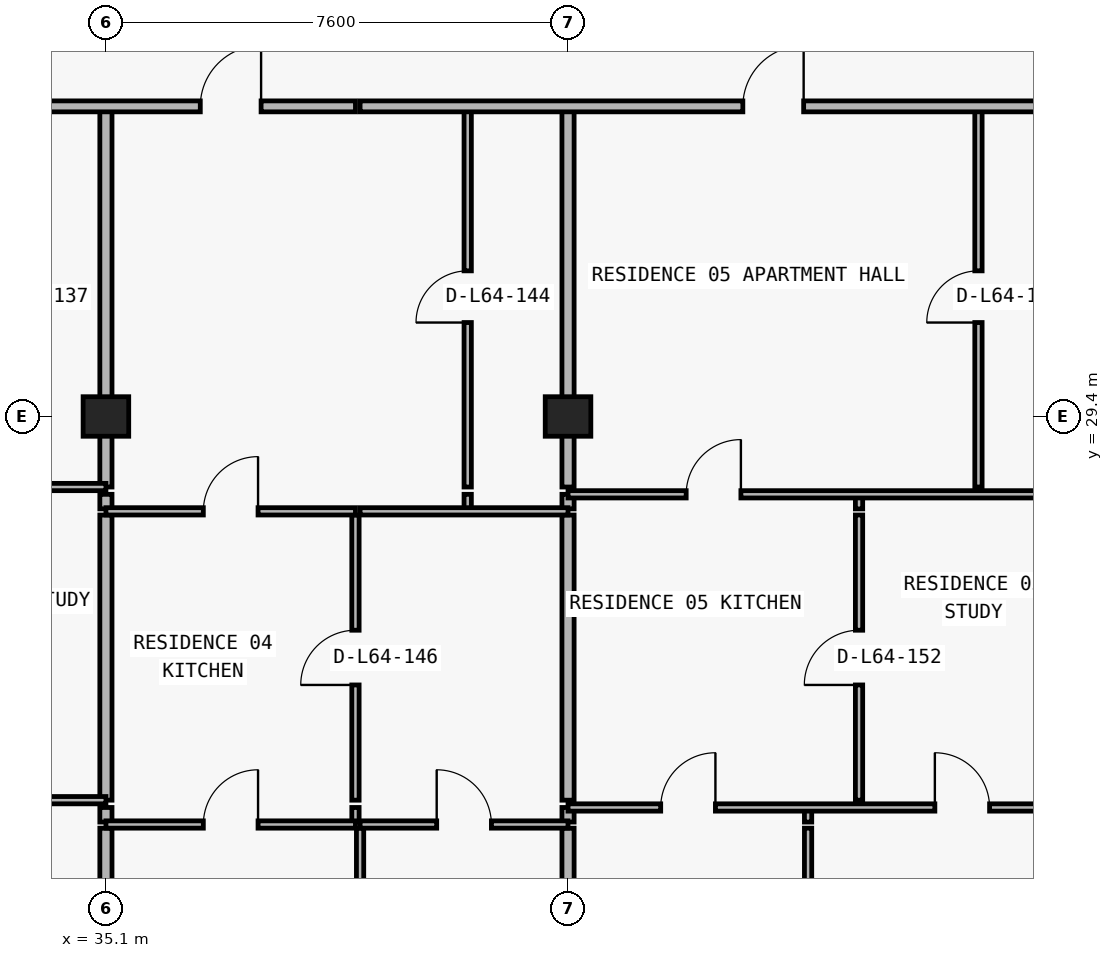
"""IFC4 building model, lengths in metres.
Left out: names, types, materials, properties, quantities, classifications, styles, units other than length and angle.
Written with IfcOpenShell. Run it as: python <this file> out.ifc"""

import sys

from ifc_helpers import new_model, si_unit, direction, frame, frame_2d, origin, origin_2d, place, context, subcontext, project, spatial, rectangle, extrude, element, fill, save


model = new_model("IFC4")
c1 = context("Model", 3, precision=1e-05, world=origin(), true_north=direction((0.0, 1.0)))
c2 = subcontext(c1, "Body", "Model", "MODEL_VIEW")
j1 = project(units=[si_unit("LENGTHUNIT", "METRE"), si_unit("PLANEANGLEUNIT", "RADIAN")], contexts=[c1])
p1 = place(None, origin())
s1 = spatial("IfcSite", under=j1, at=p1, CompositionType="ELEMENT")
p2 = place(p1, origin())
s2 = spatial("IfcBuilding", under=s1, at=p2, CompositionType="ELEMENT")
p3 = place(p2, frame((0.0, 0.0, 229.8)))
s3 = spatial("IfcBuildingStorey", under=s2, at=p3, CompositionType="ELEMENT", Elevation=229.8)
for number, where, z_axis, x_axis in (
    (1, (35.1, 29.4, 0.0), (0.0, 0.0, 1.0), (1.0, 0.0, 0.0)),
    (2, (42.7, 29.4, 0.0), (0.0, 0.0, 1.0), (1.0, 0.0, 0.0)),
):
    element("IfcColumn", number, at=place(p3, frame(where, z_axis=z_axis, x_axis=x_axis)), inside=s3, PredefinedType="COLUMN", context=c2, shape_type="SweptSolid", body=[
        extrude(rectangle(XDim=0.75, YDim=0.65, at=origin_2d()), origin(), (0.0, 0.0, 1.0), 3.05),
    ])
p4 = place(p3, frame((35.1, 13.34, 0.0), z_axis=(0.0, 0.0, 1.0), x_axis=(0.0, 1.0, 0.0)))
e3 = element("IfcWall", 3, at=p4, inside=s3, PredefinedType="PARTITIONING", context=c2, shape_type="SweptSolid", body=[
    extrude(rectangle(XDim=9.29, YDim=0.2, at=frame_2d((4.645, 0.0))), origin(), (0.0, 0.0, 1.0), 2.263),
])
p5 = place(p3, frame((35.1, 22.73, 0.0), z_axis=(0.0, 0.0, 1.0), x_axis=(0.0, 1.0, 0.0)))
e4 = element("IfcWall", 4, at=p5, inside=s3, PredefinedType="PARTITIONING", context=c2, shape_type="SweptSolid", body=[
    extrude(rectangle(XDim=0.24, YDim=0.2, at=frame_2d((0.12, 0.0))), origin(), (0.0, 0.0, 1.0), 2.263),
])
p6 = place(p3, frame((35.1, 23.09, 0.0), z_axis=(0.0, 0.0, 1.0), x_axis=(0.0, 1.0, 0.0)))
e5 = element("IfcWall", 5, at=p6, inside=s3, PredefinedType="PARTITIONING", context=c2, shape_type="SweptSolid", body=[
    extrude(rectangle(XDim=4.69, YDim=0.2, at=frame_2d((2.345, 0.0))), origin(), (0.0, 0.0, 1.0), 2.263),
])
p7 = place(p3, frame((35.1, 27.88, 0.0), z_axis=(0.0, 0.0, 1.0), x_axis=(0.0, 1.0, 0.0)))
e6 = element("IfcWall", 6, at=p7, inside=s3, PredefinedType="PARTITIONING", context=c2, shape_type="SweptSolid", body=[
    extrude(rectangle(XDim=0.24, YDim=0.2, at=frame_2d((0.12, 0.0))), origin(), (0.0, 0.0, 1.0), 2.263),
])
p8 = place(p3, frame((35.1, 28.24, 0.0), z_axis=(0.0, 0.0, 1.0), x_axis=(0.0, 1.0, 0.0)))
e7 = element("IfcWall", 7, at=p8, inside=s3, PredefinedType="PARTITIONING", context=c2, shape_type="SweptSolid", body=[
    extrude(rectangle(XDim=6.26, YDim=0.2, at=frame_2d((3.13, 0.0))), origin(), (0.0, 0.0, 1.0), 2.263),
])
p9 = place(p3, frame((39.204, 22.73, 0.0), z_axis=(0.0, 0.0, 1.0), x_axis=(0.0, 1.0, 0.0)))
e8 = element("IfcWall", 8, at=p9, inside=s3, PredefinedType="PARTITIONING", context=c2, shape_type="SweptSolid", body=[
    extrude(rectangle(XDim=0.24, YDim=0.12, at=frame_2d((0.12, 0.0))), origin(), (0.0, 0.0, 1.0), 3.05),
])
p10 = place(p3, frame((39.204, 23.09, 0.0), z_axis=(0.0, 0.0, 1.0), x_axis=(0.0, 1.0, 0.0)))
e9 = element("IfcWall", 9, at=p10, inside=s3, PredefinedType="PARTITIONING", context=c2, shape_type="SweptSolid", body=[
    extrude(rectangle(XDim=4.69, YDim=0.12, at=frame_2d((2.345, 0.0))), origin(), (0.0, 0.0, 1.0), 3.05),
])
p11 = place(p10, frame((1.895, 0.0, 0.0)))
e10 = element("IfcOpeningElement", 10, at=p11, cuts=e9, PredefinedType="OPENING", context=c2, shape_type="SweptSolid", body=[
    extrude(rectangle(XDim=0.9, YDim=2.15, at=frame_2d((0.45, 1.075))), frame((0.0, 0.07, 0.0), z_axis=(0.0, -1.0, 0.0), x_axis=(1.0, 0.0, 0.0)), (0.0, 0.0, 1.0), 0.14),
])
p12 = place(p3, frame((39.28, 13.34, 0.0), z_axis=(0.0, 0.0, 1.0), x_axis=(0.0, 1.0, 0.0)))
e11 = element("IfcWall", 11, at=p12, inside=s3, PredefinedType="PARTITIONING", context=c2, shape_type="SweptSolid", body=[
    extrude(rectangle(XDim=9.29, YDim=0.12, at=frame_2d((4.645, 0.0))), origin(), (0.0, 0.0, 1.0), 3.05),
])
p13 = place(p3, frame((41.05, 27.88, 0.0), z_axis=(0.0, 0.0, 1.0), x_axis=(0.0, 1.0, 0.0)))
e12 = element("IfcWall", 12, at=p13, inside=s3, PredefinedType="PARTITIONING", context=c2, shape_type="SweptSolid", body=[
    extrude(rectangle(XDim=0.24, YDim=0.12, at=frame_2d((0.12, 0.0))), origin(), (0.0, 0.0, 1.0), 3.05),
])
p14 = place(p3, frame((41.05, 28.24, 0.0), z_axis=(0.0, 0.0, 1.0), x_axis=(0.0, 1.0, 0.0)))
e13 = element("IfcWall", 13, at=p14, inside=s3, PredefinedType="PARTITIONING", context=c2, shape_type="SweptSolid", body=[
    extrude(rectangle(XDim=6.26, YDim=0.12, at=frame_2d((3.13, 0.0))), origin(), (0.0, 0.0, 1.0), 3.05),
])
p15 = place(p14, frame((2.705, 0.0, 0.0)))
e14 = element("IfcOpeningElement", 14, at=p15, cuts=e13, PredefinedType="OPENING", context=c2, shape_type="SweptSolid", body=[
    extrude(rectangle(XDim=0.85, YDim=2.1, at=frame_2d((0.425, 1.05))), frame((0.0, 0.07, 0.0), z_axis=(0.0, -1.0, 0.0), x_axis=(1.0, 0.0, 0.0)), (0.0, 0.0, 1.0), 0.14),
])
p16 = place(p3, frame((42.7, 13.34, 0.0), z_axis=(0.0, 0.0, 1.0), x_axis=(0.0, 1.0, 0.0)))
e15 = element("IfcWall", 15, at=p16, inside=s3, PredefinedType="PARTITIONING", context=c2, shape_type="SweptSolid", body=[
    extrude(rectangle(XDim=9.29, YDim=0.2, at=frame_2d((4.645, 0.0))), origin(), (0.0, 0.0, 1.0), 2.263),
])
p17 = place(p3, frame((42.7, 22.73, 0.0), z_axis=(0.0, 0.0, 1.0), x_axis=(0.0, 1.0, 0.0)))
e16 = element("IfcWall", 16, at=p17, inside=s3, PredefinedType="PARTITIONING", context=c2, shape_type="SweptSolid", body=[
    extrude(rectangle(XDim=0.24, YDim=0.2, at=frame_2d((0.12, 0.0))), origin(), (0.0, 0.0, 1.0), 2.263),
])
p18 = place(p3, frame((42.7, 23.09, 0.0), z_axis=(0.0, 0.0, 1.0), x_axis=(0.0, 1.0, 0.0)))
e17 = element("IfcWall", 17, at=p18, inside=s3, PredefinedType="PARTITIONING", context=c2, shape_type="SweptSolid", body=[
    extrude(rectangle(XDim=4.69, YDim=0.2, at=frame_2d((2.345, 0.0))), origin(), (0.0, 0.0, 1.0), 2.263),
])
p19 = place(p3, frame((42.7, 27.88, 0.0), z_axis=(0.0, 0.0, 1.0), x_axis=(0.0, 1.0, 0.0)))
e18 = element("IfcWall", 18, at=p19, inside=s3, PredefinedType="PARTITIONING", context=c2, shape_type="SweptSolid", body=[
    extrude(rectangle(XDim=0.24, YDim=0.2, at=frame_2d((0.12, 0.0))), origin(), (0.0, 0.0, 1.0), 2.263),
])
p20 = place(p3, frame((42.7, 28.24, 0.0), z_axis=(0.0, 0.0, 1.0), x_axis=(0.0, 1.0, 0.0)))
e19 = element("IfcWall", 19, at=p20, inside=s3, PredefinedType="PARTITIONING", context=c2, shape_type="SweptSolid", body=[
    extrude(rectangle(XDim=6.26, YDim=0.2, at=frame_2d((3.13, 0.0))), origin(), (0.0, 0.0, 1.0), 2.263),
])
p21 = place(p3, frame((46.648, 13.34, 0.0), z_axis=(0.0, 0.0, 1.0), x_axis=(0.0, 1.0, 0.0)))
e20 = element("IfcWall", 20, at=p21, inside=s3, PredefinedType="PARTITIONING", context=c2, shape_type="SweptSolid", body=[
    extrude(rectangle(XDim=9.29, YDim=0.12, at=frame_2d((4.645, 0.0))), origin(), (0.0, 0.0, 1.0), 3.05),
])
p22 = place(p3, frame((46.648, 22.73, 0.0), z_axis=(0.0, 0.0, 1.0), x_axis=(0.0, 1.0, 0.0)))
e21 = element("IfcWall", 21, at=p22, inside=s3, PredefinedType="PARTITIONING", context=c2, shape_type="SweptSolid", body=[
    extrude(rectangle(XDim=0.24, YDim=0.12, at=frame_2d((0.12, 0.0))), origin(), (0.0, 0.0, 1.0), 3.05),
])
p23 = place(p3, frame((47.486, 23.09, 0.0), z_axis=(0.0, 0.0, 1.0), x_axis=(0.0, 1.0, 0.0)))
e22 = element("IfcWall", 22, at=p23, inside=s3, PredefinedType="PARTITIONING", context=c2, shape_type="SweptSolid", body=[
    extrude(rectangle(XDim=4.69, YDim=0.12, at=frame_2d((2.345, 0.0))), origin(), (0.0, 0.0, 1.0), 3.05),
])
p24 = place(p23, frame((1.895, 0.0, 0.0)))
e23 = element("IfcOpeningElement", 23, at=p24, cuts=e22, PredefinedType="OPENING", context=c2, shape_type="SweptSolid", body=[
    extrude(rectangle(XDim=0.9, YDim=2.15, at=frame_2d((0.45, 1.075))), frame((0.0, 0.07, 0.0), z_axis=(0.0, -1.0, 0.0), x_axis=(1.0, 0.0, 0.0)), (0.0, 0.0, 1.0), 0.14),
])
p25 = place(p3, frame((47.486, 27.88, 0.0), z_axis=(0.0, 0.0, 1.0), x_axis=(0.0, 1.0, 0.0)))
e24 = element("IfcWall", 24, at=p25, inside=s3, PredefinedType="PARTITIONING", context=c2, shape_type="SweptSolid", body=[
    extrude(rectangle(XDim=0.24, YDim=0.12, at=frame_2d((0.12, 0.0))), origin(), (0.0, 0.0, 1.0), 3.05),
])
p26 = place(p3, frame((49.45, 28.24, 0.0), z_axis=(0.0, 0.0, 1.0), x_axis=(0.0, 1.0, 0.0)))
e25 = element("IfcWall", 25, at=p26, inside=s3, PredefinedType="PARTITIONING", context=c2, shape_type="SweptSolid", body=[
    extrude(rectangle(XDim=6.26, YDim=0.12, at=frame_2d((3.13, 0.0))), origin(), (0.0, 0.0, 1.0), 3.05),
])
p27 = place(p26, frame((2.705, 0.0, 0.0)))
e26 = element("IfcOpeningElement", 26, at=p27, cuts=e25, PredefinedType="OPENING", context=c2, shape_type="SweptSolid", body=[
    extrude(rectangle(XDim=0.85, YDim=2.1, at=frame_2d((0.425, 1.05))), frame((0.0, 0.07, 0.0), z_axis=(0.0, -1.0, 0.0), x_axis=(1.0, 0.0, 0.0)), (0.0, 0.0, 1.0), 0.14),
])
p28 = place(p3, frame((35.1, 22.69, 0.0), z_axis=(0.0, 0.0, 1.0), x_axis=(1.0, 0.0, 0.0)))
e27 = element("IfcWall", 27, at=p28, inside=s3, PredefinedType="PARTITIONING", context=c2, shape_type="SweptSolid", body=[
    extrude(rectangle(XDim=4.104, YDim=0.12, at=frame_2d((2.052, 0.0))), origin(), (0.0, 0.0, 1.0), 3.05),
])
p29 = place(p28, frame((1.602, 0.0, 0.0)))
e28 = element("IfcOpeningElement", 28, at=p29, cuts=e27, PredefinedType="OPENING", context=c2, shape_type="SweptSolid", body=[
    extrude(rectangle(XDim=0.9, YDim=2.15, at=frame_2d((0.45, 1.075))), frame((0.0, 0.07, 0.0), z_axis=(0.0, -1.0, 0.0), x_axis=(1.0, 0.0, 0.0)), (0.0, 0.0, 1.0), 0.14),
])
p30 = place(p3, frame((39.28, 22.69, 0.0), z_axis=(0.0, 0.0, 1.0), x_axis=(1.0, 0.0, 0.0)))
e29 = element("IfcWall", 29, at=p30, inside=s3, PredefinedType="PARTITIONING", context=c2, shape_type="SweptSolid", body=[
    extrude(rectangle(XDim=3.42, YDim=0.12, at=frame_2d((1.71, 0.0))), origin(), (0.0, 0.0, 1.0), 3.05),
])
p31 = place(p30, frame((1.26, 0.0, 0.0)))
e30 = element("IfcOpeningElement", 30, at=p31, cuts=e29, PredefinedType="OPENING", context=c2, shape_type="SweptSolid", body=[
    extrude(rectangle(XDim=0.9, YDim=2.15, at=frame_2d((0.45, 1.075))), frame((0.0, 0.07, 0.0), z_axis=(0.0, -1.0, 0.0), x_axis=(1.0, 0.0, 0.0)), (0.0, 0.0, 1.0), 0.14),
])
p32 = place(p3, frame((42.7, 22.97, 0.0), z_axis=(0.0, 0.0, 1.0), x_axis=(1.0, 0.0, 0.0)))
e31 = element("IfcWall", 31, at=p32, inside=s3, PredefinedType="PARTITIONING", context=c2, shape_type="SweptSolid", body=[
    extrude(rectangle(XDim=8.18, YDim=0.12, at=frame_2d((4.09, 0.0))), origin(), (0.0, 0.0, 1.0), 3.05),
])
p33 = place(p32, frame((1.524, 0.0, 0.0)))
e32 = element("IfcOpeningElement", 32, at=p33, cuts=e31, PredefinedType="OPENING", context=c2, shape_type="SweptSolid", body=[
    extrude(rectangle(XDim=0.9, YDim=2.15, at=frame_2d((0.45, 1.075))), frame((0.0, 0.07, 0.0), z_axis=(0.0, -1.0, 0.0), x_axis=(1.0, 0.0, 0.0)), (0.0, 0.0, 1.0), 0.14),
])
p34 = place(p32, frame((6.033, 0.0, 0.0)))
e33 = element("IfcOpeningElement", 33, at=p34, cuts=e31, PredefinedType="OPENING", context=c2, shape_type="SweptSolid", body=[
    extrude(rectangle(XDim=0.9, YDim=2.15, at=frame_2d((0.45, 1.075))), frame((0.0, 0.07, 0.0), z_axis=(0.0, -1.0, 0.0), x_axis=(1.0, 0.0, 0.0)), (0.0, 0.0, 1.0), 0.14),
])
p35 = place(p3, frame((26.92, 23.09, 0.0), z_axis=(0.0, 0.0, 1.0), x_axis=(1.0, 0.0, 0.0)))
e34 = element("IfcWall", 34, at=p35, inside=s3, PredefinedType="PARTITIONING", context=c2, shape_type="SweptSolid", body=[
    extrude(rectangle(XDim=8.18, YDim=0.12, at=frame_2d((4.09, 0.0))), origin(), (0.0, 0.0, 1.0), 3.05),
])
p36 = place(p35, frame((1.414, 0.0, 0.0)))
e35 = element("IfcOpeningElement", 35, at=p36, cuts=e34, PredefinedType="OPENING", context=c2, shape_type="SweptSolid", body=[
    extrude(rectangle(XDim=0.9, YDim=2.15, at=frame_2d((0.45, 1.075))), frame((0.0, 0.07, 0.0), z_axis=(0.0, -1.0, 0.0), x_axis=(1.0, 0.0, 0.0)), (0.0, 0.0, 1.0), 0.14),
])
p37 = place(p35, frame((5.673, 0.0, 0.0)))
e36 = element("IfcOpeningElement", 36, at=p37, cuts=e34, PredefinedType="OPENING", context=c2, shape_type="SweptSolid", body=[
    extrude(rectangle(XDim=0.9, YDim=2.15, at=frame_2d((0.45, 1.075))), frame((0.0, 0.07, 0.0), z_axis=(0.0, -1.0, 0.0), x_axis=(1.0, 0.0, 0.0)), (0.0, 0.0, 1.0), 0.14),
])
p38 = place(p3, frame((35.1, 27.84, 0.0), z_axis=(0.0, 0.0, 1.0), x_axis=(1.0, 0.0, 0.0)))
e37 = element("IfcWall", 37, at=p38, inside=s3, PredefinedType="PARTITIONING", context=c2, shape_type="SweptSolid", body=[
    extrude(rectangle(XDim=4.104, YDim=0.12, at=frame_2d((2.052, 0.0))), origin(), (0.0, 0.0, 1.0), 3.05),
])
p39 = place(p38, frame((1.602, 0.0, 0.0)))
e38 = element("IfcOpeningElement", 38, at=p39, cuts=e37, PredefinedType="OPENING", context=c2, shape_type="SweptSolid", body=[
    extrude(rectangle(XDim=0.9, YDim=2.15, at=frame_2d((0.45, 1.075))), frame((0.0, 0.07, 0.0), z_axis=(0.0, -1.0, 0.0), x_axis=(1.0, 0.0, 0.0)), (0.0, 0.0, 1.0), 0.14),
])
p40 = place(p3, frame((39.28, 27.84, 0.0), z_axis=(0.0, 0.0, 1.0), x_axis=(1.0, 0.0, 0.0)))
e39 = element("IfcWall", 39, at=p40, inside=s3, PredefinedType="PARTITIONING", context=c2, shape_type="SweptSolid", body=[
    extrude(rectangle(XDim=3.42, YDim=0.12, at=frame_2d((1.71, 0.0))), origin(), (0.0, 0.0, 1.0), 3.05),
])
p41 = place(p3, frame((42.7, 28.12, 0.0), z_axis=(0.0, 0.0, 1.0), x_axis=(1.0, 0.0, 0.0)))
e40 = element("IfcWall", 40, at=p41, inside=s3, PredefinedType="PARTITIONING", context=c2, shape_type="SweptSolid", body=[
    extrude(rectangle(XDim=8.18, YDim=0.12, at=frame_2d((4.09, 0.0))), origin(), (0.0, 0.0, 1.0), 3.05),
])
p42 = place(p41, frame((1.943, 0.0, 0.0)))
e41 = element("IfcOpeningElement", 41, at=p42, cuts=e40, PredefinedType="OPENING", context=c2, shape_type="SweptSolid", body=[
    extrude(rectangle(XDim=0.9, YDim=2.15, at=frame_2d((0.45, 1.075))), frame((0.0, 0.07, 0.0), z_axis=(0.0, -1.0, 0.0), x_axis=(1.0, 0.0, 0.0)), (0.0, 0.0, 1.0), 0.14),
])
p43 = place(p3, frame((26.92, 28.24, 0.0), z_axis=(0.0, 0.0, 1.0), x_axis=(1.0, 0.0, 0.0)))
e42 = element("IfcWall", 42, at=p43, inside=s3, PredefinedType="PARTITIONING", context=c2, shape_type="SweptSolid", body=[
    extrude(rectangle(XDim=8.18, YDim=0.12, at=frame_2d((4.09, 0.0))), origin(), (0.0, 0.0, 1.0), 3.05),
])
p44 = place(p43, frame((1.583, 0.0, 0.0)))
e43 = element("IfcOpeningElement", 43, at=p44, cuts=e42, PredefinedType="OPENING", context=c2, shape_type="SweptSolid", body=[
    extrude(rectangle(XDim=0.9, YDim=2.15, at=frame_2d((0.45, 1.075))), frame((0.0, 0.07, 0.0), z_axis=(0.0, -1.0, 0.0), x_axis=(1.0, 0.0, 0.0)), (0.0, 0.0, 1.0), 0.14),
])
p45 = place(p3, frame((26.7, 34.5, 0.0), z_axis=(0.0, 0.0, 1.0), x_axis=(1.0, 0.0, 0.0)))
e44 = element("IfcWall", 44, at=p45, inside=s3, PredefinedType="PARTITIONING", context=c2, shape_type="SweptSolid", body=[
    extrude(rectangle(XDim=12.504, YDim=0.18, at=frame_2d((6.252, 0.0))), origin(), (0.0, 0.0, 1.0), 3.05),
])
p46 = place(p45, frame((2.875, 0.0, 0.0)))
e45 = element("IfcOpeningElement", 45, at=p46, cuts=e44, PredefinedType="OPENING", context=c2, shape_type="SweptSolid", body=[
    extrude(rectangle(XDim=1.0, YDim=2.2, at=frame_2d((0.5, 1.1))), frame((0.0, 0.1, 0.0), z_axis=(0.0, -1.0, 0.0), x_axis=(1.0, 0.0, 0.0)), (0.0, 0.0, 1.0), 0.2),
])
p47 = place(p45, frame((9.952, 0.0, 0.0)))
e46 = element("IfcOpeningElement", 46, at=p47, cuts=e44, PredefinedType="OPENING", context=c2, shape_type="SweptSolid", body=[
    extrude(rectangle(XDim=1.0, YDim=2.2, at=frame_2d((0.5, 1.1))), frame((0.0, 0.1, 0.0), z_axis=(0.0, -1.0, 0.0), x_axis=(1.0, 0.0, 0.0)), (0.0, 0.0, 1.0), 0.2),
])
p48 = place(p3, frame((39.28, 34.5, 0.0), z_axis=(0.0, 0.0, 1.0), x_axis=(1.0, 0.0, 0.0)))
e47 = element("IfcWall", 47, at=p48, inside=s3, PredefinedType="PARTITIONING", context=c2, shape_type="SweptSolid", body=[
    extrude(rectangle(XDim=26.42, YDim=0.18, at=frame_2d((13.21, 0.0))), origin(), (0.0, 0.0, 1.0), 3.05),
])
p49 = place(p48, frame((6.295, 0.0, 0.0)))
e48 = element("IfcOpeningElement", 48, at=p49, cuts=e47, PredefinedType="OPENING", context=c2, shape_type="SweptSolid", body=[
    extrude(rectangle(XDim=1.0, YDim=2.2, at=frame_2d((0.5, 1.1))), frame((0.0, 0.1, 0.0), z_axis=(0.0, -1.0, 0.0), x_axis=(1.0, 0.0, 0.0)), (0.0, 0.0, 1.0), 0.2),
])
p50 = place(p48, frame((14.695, 0.0, 0.0)))
e49 = element("IfcOpeningElement", 49, at=p50, cuts=e47, PredefinedType="OPENING", context=c2, shape_type="SweptSolid", body=[
    extrude(rectangle(XDim=1.0, YDim=2.2, at=frame_2d((0.5, 1.1))), frame((0.0, 0.1, 0.0), z_axis=(0.0, -1.0, 0.0), x_axis=(1.0, 0.0, 0.0)), (0.0, 0.0, 1.0), 0.2),
])
p51 = place(p48, frame((21.995, 0.0, 0.0)))
e50 = element("IfcOpeningElement", 50, at=p51, cuts=e47, PredefinedType="OPENING", context=c2, shape_type="SweptSolid", body=[
    extrude(rectangle(XDim=1.0, YDim=2.2, at=frame_2d((0.5, 1.1))), frame((0.0, 0.1, 0.0), z_axis=(0.0, -1.0, 0.0), x_axis=(1.0, 0.0, 0.0)), (0.0, 0.0, 1.0), 0.2),
])
p52 = place(p47, origin())
e51 = element("IfcDoor", 51, at=p52, inside=s3, OperationType="SINGLE_SWING_RIGHT", PredefinedType="DOOR", context=c2, shape_type="SweptSolid", body=[
    extrude(rectangle(XDim=1.0, YDim=2.2, at=frame_2d((0.5, 1.1))), frame((0.0, 0.025, 0.0), z_axis=(0.0, -1.0, 0.0), x_axis=(1.0, 0.0, 0.0)), (0.0, 0.0, 1.0), 0.05),
])
fill(e46, e51)
p53 = place(p15, origin())
e52 = element("IfcDoor", 52, at=p53, inside=s3, OperationType="SINGLE_SWING_LEFT", PredefinedType="DOOR", context=c2, shape_type="SweptSolid", body=[
    extrude(rectangle(XDim=0.85, YDim=2.1, at=frame_2d((0.425, 1.05))), frame((0.0, 0.025, 0.0), z_axis=(0.0, -1.0, 0.0), x_axis=(1.0, 0.0, 0.0)), (0.0, 0.0, 1.0), 0.05),
])
fill(e14, e52)
p54 = place(p39, origin())
e53 = element("IfcDoor", 53, at=p54, inside=s3, OperationType="SINGLE_SWING_RIGHT", PredefinedType="DOOR", context=c2, shape_type="SweptSolid", body=[
    extrude(rectangle(XDim=0.9, YDim=2.15, at=frame_2d((0.45, 1.075))), frame((0.0, 0.025, 0.0), z_axis=(0.0, -1.0, 0.0), x_axis=(1.0, 0.0, 0.0)), (0.0, 0.0, 1.0), 0.05),
])
fill(e38, e53)
p55 = place(p11, origin())
e54 = element("IfcDoor", 54, at=p55, inside=s3, OperationType="SINGLE_SWING_LEFT", PredefinedType="DOOR", context=c2, shape_type="SweptSolid", body=[
    extrude(rectangle(XDim=0.9, YDim=2.15, at=frame_2d((0.45, 1.075))), frame((0.0, 0.025, 0.0), z_axis=(0.0, -1.0, 0.0), x_axis=(1.0, 0.0, 0.0)), (0.0, 0.0, 1.0), 0.05),
])
fill(e10, e54)
p56 = place(p29, origin())
e55 = element("IfcDoor", 55, at=p56, inside=s3, OperationType="SINGLE_SWING_RIGHT", PredefinedType="DOOR", context=c2, shape_type="SweptSolid", body=[
    extrude(rectangle(XDim=0.9, YDim=2.15, at=frame_2d((0.45, 1.075))), frame((0.0, 0.025, 0.0), z_axis=(0.0, -1.0, 0.0), x_axis=(1.0, 0.0, 0.0)), (0.0, 0.0, 1.0), 0.05),
])
fill(e28, e55)
p57 = place(p31, origin())
e56 = element("IfcDoor", 56, at=p57, inside=s3, OperationType="SINGLE_SWING_LEFT", PredefinedType="DOOR", context=c2, shape_type="SweptSolid", body=[
    extrude(rectangle(XDim=0.9, YDim=2.15, at=frame_2d((0.45, 1.075))), frame((0.0, 0.025, 0.0), z_axis=(0.0, -1.0, 0.0), x_axis=(1.0, 0.0, 0.0)), (0.0, 0.0, 1.0), 0.05),
])
fill(e30, e56)
p58 = place(p49, origin())
e57 = element("IfcDoor", 57, at=p58, inside=s3, OperationType="SINGLE_SWING_RIGHT", PredefinedType="DOOR", context=c2, shape_type="SweptSolid", body=[
    extrude(rectangle(XDim=1.0, YDim=2.2, at=frame_2d((0.5, 1.1))), frame((0.0, 0.025, 0.0), z_axis=(0.0, -1.0, 0.0), x_axis=(1.0, 0.0, 0.0)), (0.0, 0.0, 1.0), 0.05),
])
fill(e48, e57)
p59 = place(p27, origin())
e58 = element("IfcDoor", 58, at=p59, inside=s3, OperationType="SINGLE_SWING_LEFT", PredefinedType="DOOR", context=c2, shape_type="SweptSolid", body=[
    extrude(rectangle(XDim=0.85, YDim=2.1, at=frame_2d((0.425, 1.05))), frame((0.0, 0.025, 0.0), z_axis=(0.0, -1.0, 0.0), x_axis=(1.0, 0.0, 0.0)), (0.0, 0.0, 1.0), 0.05),
])
fill(e26, e58)
p60 = place(p42, origin())
e59 = element("IfcDoor", 59, at=p60, inside=s3, OperationType="SINGLE_SWING_RIGHT", PredefinedType="DOOR", context=c2, shape_type="SweptSolid", body=[
    extrude(rectangle(XDim=0.9, YDim=2.15, at=frame_2d((0.45, 1.075))), frame((0.0, 0.025, 0.0), z_axis=(0.0, -1.0, 0.0), x_axis=(1.0, 0.0, 0.0)), (0.0, 0.0, 1.0), 0.05),
])
fill(e41, e59)
p61 = place(p24, origin())
e60 = element("IfcDoor", 60, at=p61, inside=s3, OperationType="SINGLE_SWING_LEFT", PredefinedType="DOOR", context=c2, shape_type="SweptSolid", body=[
    extrude(rectangle(XDim=0.9, YDim=2.15, at=frame_2d((0.45, 1.075))), frame((0.0, 0.025, 0.0), z_axis=(0.0, -1.0, 0.0), x_axis=(1.0, 0.0, 0.0)), (0.0, 0.0, 1.0), 0.05),
])
fill(e23, e60)
p62 = place(p33, origin())
e61 = element("IfcDoor", 61, at=p62, inside=s3, OperationType="SINGLE_SWING_RIGHT", PredefinedType="DOOR", context=c2, shape_type="SweptSolid", body=[
    extrude(rectangle(XDim=0.9, YDim=2.15, at=frame_2d((0.45, 1.075))), frame((0.0, 0.025, 0.0), z_axis=(0.0, -1.0, 0.0), x_axis=(1.0, 0.0, 0.0)), (0.0, 0.0, 1.0), 0.05),
])
fill(e32, e61)
p63 = place(p34, origin())
e62 = element("IfcDoor", 62, at=p63, inside=s3, OperationType="SINGLE_SWING_LEFT", PredefinedType="DOOR", context=c2, shape_type="SweptSolid", body=[
    extrude(rectangle(XDim=0.9, YDim=2.15, at=frame_2d((0.45, 1.075))), frame((0.0, 0.025, 0.0), z_axis=(0.0, -1.0, 0.0), x_axis=(1.0, 0.0, 0.0)), (0.0, 0.0, 1.0), 0.05),
])
fill(e33, e62)
save(model, sys.argv[1])
